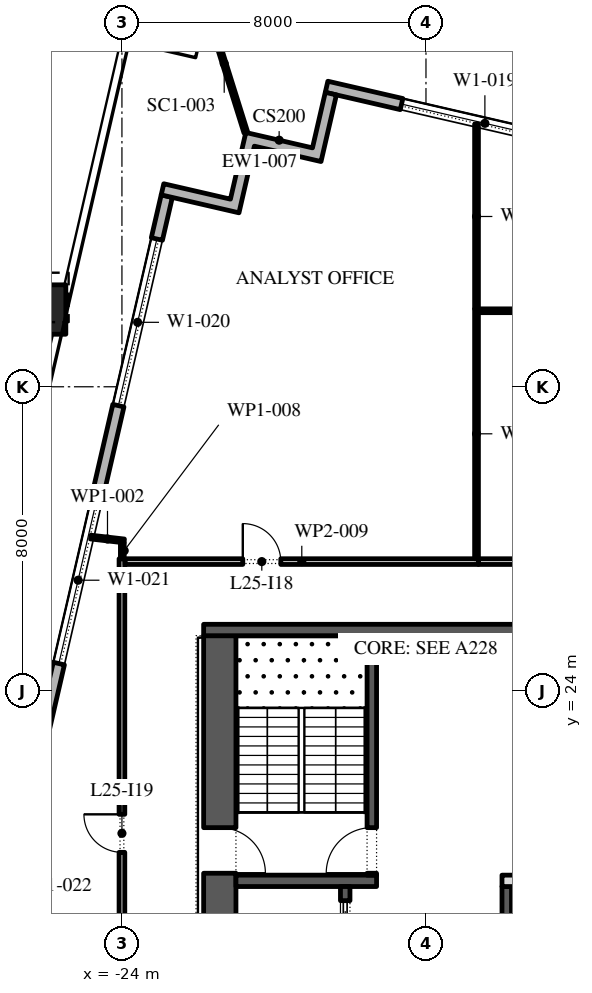
"""IFC4 building model, lengths in metres.
Left out: names, types, materials, properties, quantities, classifications, styles, units other than length and angle.
Written with IfcOpenShell. Run it as: python <this file> out.ifc"""

import sys

from ifc_helpers import new_model, si_unit, direction, frame, frame_2d, origin, origin_2d, place, context, subcontext, project, spatial, polyline, rectangle, outline, extrude, element, fill, save


model = new_model("IFC4")
c1 = context("Model", 3, precision=1e-05, world=origin(), true_north=direction((0.0, 1.0)))
c2 = subcontext(c1, "Body", "Model", "MODEL_VIEW")
j1 = project(units=[si_unit("LENGTHUNIT", "METRE"), si_unit("PLANEANGLEUNIT", "RADIAN")], contexts=[c1])
p1 = place(None, origin())
s1 = spatial("IfcSite", under=j1, at=p1, CompositionType="ELEMENT")
p2 = place(p1, origin())
s2 = spatial("IfcBuilding", under=s1, at=p2, CompositionType="ELEMENT")
p3 = place(p2, frame((0.0, 0.0, 118.2)))
s3 = spatial("IfcBuildingStorey", under=s2, at=p3, CompositionType="ELEMENT", Elevation=118.2)
p4 = place(p3, frame((-26.126, 34.032, 0.0), z_axis=(0.017501948819, 0.075745189095, 0.996973594493), x_axis=(-0.974328337224, 0.225131719848, 0.0)))
e1 = element("IfcColumn", 1, at=p4, inside=s3, PredefinedType="COLUMN", context=c2, shape_type="SweptSolid", body=[
    extrude(rectangle(XDim=1.3, YDim=1.3, at=origin_2d()), origin(), (0.0, 0.0, 1.0), 4.213),
])
p5 = place(p3, frame((31.078, 28.421, 0.0), z_axis=(0.0, 0.0, 1.0), x_axis=(-0.974370456532, 0.224949357493, 0.0)))
e2 = element("IfcWall", 2, at=p5, inside=s3, PredefinedType="STANDARD", context=c2, shape_type="SweptSolid", body=[
    extrude(rectangle(XDim=51.0, YDim=0.3, at=frame_2d((25.5, 0.0))), origin(), (0.0, 0.0, 1.0), 4.0),
])
p6 = place(p5, frame((1.875, 0.0, 0.45)))
e3 = element("IfcOpeningElement", 3, at=p6, cuts=e2, PredefinedType="OPENING", context=c2, shape_type="SweptSolid", body=[
    extrude(rectangle(XDim=4.5, YDim=3.0, at=frame_2d((2.25, 1.5))), frame((0.0, 0.16, 0.0), z_axis=(0.0, -1.0, 0.0), x_axis=(1.0, 0.0, 0.0)), (0.0, 0.0, 1.0), 0.32),
])
p7 = place(p5, frame((10.275, 0.0, 0.45)))
e4 = element("IfcOpeningElement", 4, at=p7, cuts=e2, PredefinedType="OPENING", context=c2, shape_type="SweptSolid", body=[
    extrude(rectangle(XDim=4.5, YDim=2.875, at=frame_2d((2.25, 1.438))), frame((0.0, 0.16, 0.0), z_axis=(0.0, -1.0, 0.0), x_axis=(1.0, 0.0, 0.0)), (0.0, 0.0, 1.0), 0.32),
])
p8 = place(p5, frame((18.825, 0.0, 0.45)))
e5 = element("IfcOpeningElement", 5, at=p8, cuts=e2, PredefinedType="OPENING", context=c2, shape_type="SweptSolid", body=[
    extrude(rectangle(XDim=4.5, YDim=2.825, at=frame_2d((2.25, 1.413))), frame((0.0, 0.16, 0.0), z_axis=(0.0, -1.0, 0.0), x_axis=(1.0, 0.0, 0.0)), (0.0, 0.0, 1.0), 0.32),
])
p9 = place(p5, frame((27.075, 0.0, 0.0)))
e6 = element("IfcOpeningElement", 6, at=p9, cuts=e2, PredefinedType="OPENING", context=c2, shape_type="SweptSolid", body=[
    extrude(rectangle(XDim=2.4, YDim=3.2, at=frame_2d((1.2, 1.6))), frame((0.0, 0.16, 0.0), z_axis=(0.0, -1.0, 0.0), x_axis=(1.0, 0.0, 0.0)), (0.0, 0.0, 1.0), 0.32),
])
p10 = place(p5, frame((35.925, 0.0, 0.45)))
e7 = element("IfcOpeningElement", 7, at=p10, cuts=e2, PredefinedType="OPENING", context=c2, shape_type="SweptSolid", body=[
    extrude(rectangle(XDim=4.5, YDim=2.575, at=frame_2d((2.25, 1.288))), frame((0.0, 0.16, 0.0), z_axis=(0.0, -1.0, 0.0), x_axis=(1.0, 0.0, 0.0)), (0.0, 0.0, 1.0), 0.32),
])
p11 = place(p5, frame((44.475, 0.0, 0.45)))
e8 = element("IfcOpeningElement", 8, at=p11, cuts=e2, PredefinedType="OPENING", context=c2, shape_type="SweptSolid", body=[
    extrude(rectangle(XDim=4.5, YDim=3.05, at=frame_2d((2.25, 1.525))), frame((0.0, 0.16, 0.0), z_axis=(0.0, -1.0, 0.0), x_axis=(1.0, 0.0, 0.0)), (0.0, 0.0, 1.0), 0.32),
])
p12 = place(p3, frame((-22.82, 37.016, 0.0), z_axis=(0.0, 0.0, 1.0), x_axis=(-0.224953880882, -0.974369412223, 0.0)))
e9 = element("IfcWall", 9, at=p12, inside=s3, PredefinedType="STANDARD", context=c2, shape_type="SweptSolid", body=[
    extrude(rectangle(XDim=49.5, YDim=0.3, at=frame_2d((24.75, 0.0))), origin(), (0.0, 0.0, 1.0), 4.0),
])
p13 = place(p12, frame((1.157, 0.0, 0.45)))
e10 = element("IfcOpeningElement", 10, at=p13, cuts=e9, PredefinedType="OPENING", context=c2, shape_type="SweptSolid", body=[
    extrude(rectangle(XDim=4.5, YDim=3.05, at=frame_2d((2.25, 1.525))), frame((0.0, 0.16, 0.0), z_axis=(0.0, -1.0, 0.0), x_axis=(1.0, 0.0, 0.0)), (0.0, 0.0, 1.0), 0.32),
])
p14 = place(p12, frame((8.121, 0.0, 0.45)))
e11 = element("IfcOpeningElement", 11, at=p14, cuts=e9, PredefinedType="OPENING", context=c2, shape_type="SweptSolid", body=[
    extrude(rectangle(XDim=4.5, YDim=3.05, at=frame_2d((2.25, 1.525))), frame((0.0, 0.16, 0.0), z_axis=(0.0, -1.0, 0.0), x_axis=(1.0, 0.0, 0.0)), (0.0, 0.0, 1.0), 0.32),
])
p15 = place(p12, frame((15.236, 0.0, 0.45)))
e12 = element("IfcOpeningElement", 12, at=p15, cuts=e9, PredefinedType="OPENING", context=c2, shape_type="SweptSolid", body=[
    extrude(rectangle(XDim=4.5, YDim=3.05, at=frame_2d((2.25, 1.525))), frame((0.0, 0.16, 0.0), z_axis=(0.0, -1.0, 0.0), x_axis=(1.0, 0.0, 0.0)), (0.0, 0.0, 1.0), 0.32),
])
p16 = place(p12, frame((23.4, 0.0, 0.0)))
e13 = element("IfcOpeningElement", 13, at=p16, cuts=e9, PredefinedType="OPENING", context=c2, shape_type="SweptSolid", body=[
    extrude(rectangle(XDim=2.4, YDim=3.5, at=frame_2d((1.2, 1.75))), frame((0.0, 0.16, 0.0), z_axis=(0.0, -1.0, 0.0), x_axis=(1.0, 0.0, 0.0)), (0.0, 0.0, 1.0), 0.32),
])
p17 = place(p12, frame((29.464, 0.0, 0.45)))
e14 = element("IfcOpeningElement", 14, at=p17, cuts=e9, PredefinedType="OPENING", context=c2, shape_type="SweptSolid", body=[
    extrude(rectangle(XDim=4.5, YDim=2.875, at=frame_2d((2.25, 1.438))), frame((0.0, 0.16, 0.0), z_axis=(0.0, -1.0, 0.0), x_axis=(1.0, 0.0, 0.0)), (0.0, 0.0, 1.0), 0.32),
])
p18 = place(p12, frame((36.579, 0.0, 0.45)))
e15 = element("IfcOpeningElement", 15, at=p18, cuts=e9, PredefinedType="OPENING", context=c2, shape_type="SweptSolid", body=[
    extrude(rectangle(XDim=4.5, YDim=2.675, at=frame_2d((2.25, 1.337))), frame((0.0, 0.16, 0.0), z_axis=(0.0, -1.0, 0.0), x_axis=(1.0, 0.0, 0.0)), (0.0, 0.0, 1.0), 0.32),
])
p19 = place(p12, frame((43.693, 0.0, 0.45)))
e16 = element("IfcOpeningElement", 16, at=p19, cuts=e9, PredefinedType="OPENING", context=c2, shape_type="SweptSolid", body=[
    extrude(rectangle(XDim=4.5, YDim=3.05, at=frame_2d((2.25, 1.525))), frame((0.0, 0.16, 0.0), z_axis=(0.0, -1.0, 0.0), x_axis=(1.0, 0.0, 0.0)), (0.0, 0.0, 1.0), 0.32),
])
p20 = place(p3, origin())
e17 = element("IfcWall", 17, at=p20, inside=s3, PredefinedType="STANDARD", context=c2, shape_type="SweptSolid", body=[
    extrude(outline(polyline([(-22.967, 37.049), (-22.899, 37.342), (-21.145, 36.937), (-20.74, 38.691), (-18.986, 38.286), (-18.649, 39.747), (-18.357, 39.68), (-18.762, 37.926), (-20.515, 38.331), (-20.92, 36.577), (-22.967, 37.049)])), origin(), (0.0, 0.0, 1.0), 4.0),
])
p21 = place(p3, frame((-20.74, 38.691, -0.05), z_axis=(0.0, 0.0, 1.0), x_axis=(-0.299038724035, 0.954240976655, 0.0)))
e18 = element("IfcWall", 18, at=p21, inside=s3, PredefinedType="STANDARD", context=c2, shape_type="SweptSolid", body=[
    extrude(rectangle(XDim=3.804, YDim=0.1, at=frame_2d((1.902, 0.0))), origin(), (0.0, 0.0, 1.0), 4.05),
])
p22 = place(p3, frame((-21.425, -2.45, 0.0), z_axis=(0.0, 0.0, 1.0), x_axis=(0.0, 1.0, 0.0)))
e19 = element("IfcWall", 19, at=p22, inside=s3, PredefinedType="SHEAR", context=c2, shape_type="SweptSolid", body=[
    extrude(rectangle(XDim=27.9, YDim=0.85, at=frame_2d((13.95, 0.0))), origin(), (0.0, 0.0, 1.0), 4.0),
])
p23 = place(p22, frame((5.05, 0.0, 0.0)))
e20 = element("IfcOpeningElement", 20, at=p23, cuts=e19, PredefinedType="OPENING", context=c2, shape_type="SweptSolid", body=[
    extrude(rectangle(XDim=1.2, YDim=2.1, at=frame_2d((0.6, 1.05))), frame((0.0, 0.435, 0.0), z_axis=(0.0, -1.0, 0.0), x_axis=(1.0, 0.0, 0.0)), (0.0, 0.0, 1.0), 0.87),
])
p24 = place(p22, frame((21.65, 0.0, 0.0)))
e21 = element("IfcOpeningElement", 21, at=p24, cuts=e19, PredefinedType="OPENING", context=c2, shape_type="SweptSolid", body=[
    extrude(rectangle(XDim=1.2, YDim=2.1, at=frame_2d((0.6, 1.05))), frame((0.0, 0.435, 0.0), z_axis=(0.0, -1.0, 0.0), x_axis=(1.0, 0.0, 0.0)), (0.0, 0.0, 1.0), 0.87),
])
p25 = place(p3, frame((-21.85, 25.6, 0.0), z_axis=(0.0, 0.0, 1.0), x_axis=(1.0, 0.0, 0.0)))
e22 = element("IfcWall", 22, at=p25, inside=s3, PredefinedType="SHEAR", context=c2, shape_type="SweptSolid", body=[
    extrude(rectangle(XDim=11.7, YDim=0.3, at=frame_2d((5.85, 0.0))), origin(), (0.0, 0.0, 1.0), 4.0),
])
p26 = place(p3, frame((-21.0, 19.0, 0.0), z_axis=(0.0, 0.0, 1.0), x_axis=(1.0, 0.0, 0.0)))
e23 = element("IfcWall", 23, at=p26, inside=s3, PredefinedType="SHEAR", context=c2, shape_type="SweptSolid", body=[
    extrude(rectangle(XDim=3.7, YDim=0.3, at=frame_2d((1.85, 0.0))), origin(), (0.0, 0.0, 1.0), 4.0),
])
p27 = place(p3, frame((-17.425, 19.15, 0.0), z_axis=(0.0, 0.0, 1.0), x_axis=(0.0, 1.0, 0.0)))
e24 = element("IfcWall", 24, at=p27, inside=s3, PredefinedType="SHEAR", context=c2, shape_type="SweptSolid", body=[
    extrude(rectangle(XDim=6.3, YDim=0.25, at=frame_2d((3.15, 0.0))), origin(), (0.0, 0.0, 1.0), 4.0),
])
p28 = place(p27, frame((0.05, 0.0, 0.0)))
e25 = element("IfcOpeningElement", 25, at=p28, cuts=e24, PredefinedType="OPENING", context=c2, shape_type="SweptSolid", body=[
    extrude(rectangle(XDim=1.2, YDim=2.1, at=frame_2d((0.6, 1.05))), frame((0.0, 0.135, 0.0), z_axis=(0.0, -1.0, 0.0), x_axis=(1.0, 0.0, 0.0)), (0.0, 0.0, 1.0), 0.27),
])
p29 = place(p3, frame((-18.125, 4.15, 0.0), z_axis=(0.0, 0.0, 1.0), x_axis=(0.0, 1.0, 0.0)))
e26 = element("IfcWall", 26, at=p29, inside=s3, PredefinedType="SHEAR", context=c2, shape_type="SweptSolid", body=[
    extrude(rectangle(XDim=14.7, YDim=0.25, at=frame_2d((7.35, 0.0))), origin(), (0.0, 0.0, 1.0), 4.0),
])
p30 = place(p29, frame((0.371, 0.0, 0.0)))
e27 = element("IfcOpeningElement", 27, at=p30, cuts=e26, PredefinedType="OPENING", context=c2, shape_type="SweptSolid", body=[
    extrude(rectangle(XDim=1.1, YDim=2.1, at=frame_2d((0.55, 1.05))), frame((0.0, 0.135, 0.0), z_axis=(0.0, -1.0, 0.0), x_axis=(1.0, 0.0, 0.0)), (0.0, 0.0, 1.0), 0.27),
])
p31 = place(p29, frame((2.514, 0.0, 0.0)))
e28 = element("IfcOpeningElement", 28, at=p31, cuts=e26, PredefinedType="OPENING", context=c2, shape_type="SweptSolid", body=[
    extrude(rectangle(XDim=1.1, YDim=2.1, at=frame_2d((0.55, 1.05))), frame((0.0, 0.135, 0.0), z_axis=(0.0, -1.0, 0.0), x_axis=(1.0, 0.0, 0.0)), (0.0, 0.0, 1.0), 0.27),
])
p32 = place(p29, frame((4.657, 0.0, 0.0)))
e29 = element("IfcOpeningElement", 29, at=p32, cuts=e26, PredefinedType="OPENING", context=c2, shape_type="SweptSolid", body=[
    extrude(rectangle(XDim=1.1, YDim=2.1, at=frame_2d((0.55, 1.05))), frame((0.0, 0.135, 0.0), z_axis=(0.0, -1.0, 0.0), x_axis=(1.0, 0.0, 0.0)), (0.0, 0.0, 1.0), 0.27),
])
p33 = place(p29, frame((6.8, 0.0, 0.0)))
e30 = element("IfcOpeningElement", 30, at=p33, cuts=e26, PredefinedType="OPENING", context=c2, shape_type="SweptSolid", body=[
    extrude(rectangle(XDim=1.1, YDim=2.1, at=frame_2d((0.55, 1.05))), frame((0.0, 0.135, 0.0), z_axis=(0.0, -1.0, 0.0), x_axis=(1.0, 0.0, 0.0)), (0.0, 0.0, 1.0), 0.27),
])
p34 = place(p29, frame((8.943, 0.0, 0.0)))
e31 = element("IfcOpeningElement", 31, at=p34, cuts=e26, PredefinedType="OPENING", context=c2, shape_type="SweptSolid", body=[
    extrude(rectangle(XDim=1.1, YDim=2.1, at=frame_2d((0.55, 1.05))), frame((0.0, 0.135, 0.0), z_axis=(0.0, -1.0, 0.0), x_axis=(1.0, 0.0, 0.0)), (0.0, 0.0, 1.0), 0.27),
])
p35 = place(p29, frame((11.086, 0.0, 0.0)))
e32 = element("IfcOpeningElement", 32, at=p35, cuts=e26, PredefinedType="OPENING", context=c2, shape_type="SweptSolid", body=[
    extrude(rectangle(XDim=1.1, YDim=2.1, at=frame_2d((0.55, 1.05))), frame((0.0, 0.135, 0.0), z_axis=(0.0, -1.0, 0.0), x_axis=(1.0, 0.0, 0.0)), (0.0, 0.0, 1.0), 0.27),
])
p36 = place(p29, frame((13.229, 0.0, 0.0)))
e33 = element("IfcOpeningElement", 33, at=p36, cuts=e26, PredefinedType="OPENING", context=c2, shape_type="SweptSolid", body=[
    extrude(rectangle(XDim=1.1, YDim=2.1, at=frame_2d((0.55, 1.05))), frame((0.0, 0.135, 0.0), z_axis=(0.0, -1.0, 0.0), x_axis=(1.0, 0.0, 0.0)), (0.0, 0.0, 1.0), 0.27),
])
p37 = place(p3, frame((-13.875, -2.45, 0.0), z_axis=(0.0, 0.0, 1.0), x_axis=(0.0, 1.0, 0.0)))
e34 = element("IfcWall", 34, at=p37, inside=s3, PredefinedType="SHEAR", context=c2, shape_type="SweptSolid", body=[
    extrude(rectangle(XDim=21.3, YDim=0.25, at=frame_2d((10.65, 0.0))), origin(), (0.0, 0.0, 1.0), 4.0),
])
p38 = place(p37, frame((14.571, 0.0, 0.0)))
e35 = element("IfcOpeningElement", 35, at=p38, cuts=e34, PredefinedType="OPENING", context=c2, shape_type="SweptSolid", body=[
    extrude(rectangle(XDim=0.9, YDim=2.1, at=frame_2d((0.45, 1.05))), frame((0.0, 0.135, 0.0), z_axis=(0.0, -1.0, 0.0), x_axis=(1.0, 0.0, 0.0)), (0.0, 0.0, 1.0), 0.27),
])
p39 = place(p37, frame((6.971, 0.0, 0.0)))
e36 = element("IfcOpeningElement", 36, at=p39, cuts=e34, PredefinedType="OPENING", context=c2, shape_type="SweptSolid", body=[
    extrude(rectangle(XDim=1.1, YDim=2.1, at=frame_2d((0.55, 1.05))), frame((0.0, 0.135, 0.0), z_axis=(0.0, -1.0, 0.0), x_axis=(1.0, 0.0, 0.0)), (0.0, 0.0, 1.0), 0.27),
])
p40 = place(p3, frame((-14.0, 19.0, 0.0), z_axis=(0.0, 0.0, 1.0), x_axis=(1.0, 0.0, 0.0)))
e37 = element("IfcWall", 37, at=p40, inside=s3, PredefinedType="PARTITIONING", context=c2, shape_type="SweptSolid", body=[
    extrude(rectangle(XDim=3.0, YDim=0.3, at=frame_2d((1.5, 0.0))), origin(), (0.0, 0.0, 1.0), 4.0),
])
p41 = place(p3, frame((-24.82, 28.045, 0.0), z_axis=(0.0, 0.0, 1.0), x_axis=(0.993501545499, -0.113818623659, 0.0)))
e38 = element("IfcWall", 38, at=p41, inside=s3, PredefinedType="PARTITIONING", context=c2, shape_type="SweptSolid", body=[
    extrude(rectangle(XDim=0.886, YDim=0.1, at=frame_2d((0.443, 0.0))), origin(), (0.0, 0.0, 1.0), 4.0),
])
p42 = place(p3, frame((-24.0, 3.45, 0.0), z_axis=(0.0, 0.0, 1.0), x_axis=(0.0, 1.0, 0.0)))
e39 = element("IfcWall", 39, at=p42, inside=s3, PredefinedType="PARTITIONING", context=c2, shape_type="SweptSolid", body=[
    extrude(rectangle(XDim=24.025, YDim=0.15, at=frame_2d((12.013, 0.0))), origin(), (0.0, 0.0, 1.0), 4.0),
])
p43 = place(p42, frame((16.3, 0.0, 0.0)))
e40 = element("IfcOpeningElement", 40, at=p43, cuts=e39, PredefinedType="OPENING", context=c2, shape_type="SweptSolid", body=[
    extrude(rectangle(XDim=1.0, YDim=2.1, at=frame_2d((0.5, 1.05))), frame((0.0, 0.085, 0.0), z_axis=(0.0, -1.0, 0.0), x_axis=(1.0, 0.0, 0.0)), (0.0, 0.0, 1.0), 0.17),
])
p44 = place(p3, frame((-23.99, 27.475, 0.0), z_axis=(0.0, 0.0, 1.0), x_axis=(0.0, 1.0, 0.0)))
e41 = element("IfcWall", 41, at=p44, inside=s3, PredefinedType="PARTITIONING", context=c2, shape_type="SweptSolid", body=[
    extrude(rectangle(XDim=0.425, YDim=0.1, at=frame_2d((0.212, 0.0))), origin(), (0.0, 0.0, 1.0), 4.0),
])
p45 = place(p3, frame((-23.915, 27.4, 0.0), z_axis=(0.0, 0.0, 1.0), x_axis=(1.0, 0.0, 0.0)))
e42 = element("IfcWall", 42, at=p45, inside=s3, PredefinedType="PARTITIONING", context=c2, shape_type="SweptSolid", body=[
    extrude(rectangle(XDim=9.295, YDim=0.15, at=frame_2d((4.647, 0.0))), origin(), (0.0, 0.0, 1.0), 4.0),
])
p46 = place(p45, frame((3.095, 0.0, 0.0)))
e43 = element("IfcOpeningElement", 43, at=p46, cuts=e42, PredefinedType="OPENING", context=c2, shape_type="SweptSolid", body=[
    extrude(rectangle(XDim=1.0, YDim=2.1, at=frame_2d((0.5, 1.05))), frame((0.0, 0.085, 0.0), z_axis=(0.0, -1.0, 0.0), x_axis=(1.0, 0.0, 0.0)), (0.0, 0.0, 1.0), 0.17),
])
p47 = place(p3, frame((-14.67, 27.475, 0.0), z_axis=(0.0, 0.0, 1.0), x_axis=(0.0, 1.0, 0.0)))
e44 = element("IfcWall", 44, at=p47, inside=s3, PredefinedType="PARTITIONING", context=c2, shape_type="SweptSolid", body=[
    extrude(rectangle(XDim=6.575, YDim=0.1, at=frame_2d((3.288, 0.0))), origin(), (0.0, 0.0, 1.0), 4.0),
])
p48 = place(p3, frame((-14.62, 27.4, 0.0), z_axis=(0.0, 0.0, 1.0), x_axis=(1.0, 0.0, 0.0)))
e45 = element("IfcWall", 45, at=p48, inside=s3, PredefinedType="PARTITIONING", context=c2, shape_type="SweptSolid", body=[
    extrude(rectangle(XDim=6.695, YDim=0.15, at=frame_2d((3.348, 0.0))), origin(), (0.0, 0.0, 1.0), 4.0),
])
p49 = place(p3, frame((-14.67, 34.05, 0.0), z_axis=(0.0, 0.0, 1.0), x_axis=(0.0, 1.0, 0.0)))
e46 = element("IfcWall", 46, at=p49, inside=s3, PredefinedType="PARTITIONING", context=c2, shape_type="SweptSolid", body=[
    extrude(rectangle(XDim=4.861, YDim=0.1, at=frame_2d((2.43, 0.0))), origin(), (0.0, 0.0, 1.0), 4.0),
])
p50 = place(p3, frame((-3.95, 34.0, 0.0), z_axis=(0.0, 0.0, 1.0), x_axis=(-1.0, 0.0, 0.0)))
e47 = element("IfcWall", 47, at=p50, inside=s3, PredefinedType="PARTITIONING", context=c2, shape_type="SweptSolid", body=[
    extrude(rectangle(XDim=10.67, YDim=0.1, at=frame_2d((5.335, 0.0))), origin(), (0.0, 0.0, 1.0), 4.0),
])
p51 = place(p50, frame((7.0, 0.0, 0.0)))
e48 = element("IfcOpeningElement", 48, at=p51, cuts=e47, PredefinedType="OPENING", context=c2, shape_type="SweptSolid", body=[
    extrude(rectangle(XDim=0.9, YDim=2.1, at=frame_2d((0.45, 1.05))), frame((0.0, 0.06, 0.0), z_axis=(0.0, -1.0, 0.0), x_axis=(1.0, 0.0, 0.0)), (0.0, 0.0, 1.0), 0.12),
])
p52 = place(p11, origin())
e49 = element("IfcWindow", 49, at=p52, inside=s3, PartitioningType="DOUBLE_PANEL_VERTICAL", PredefinedType="WINDOW", context=c2, shape_type="SweptSolid", body=[
    extrude(rectangle(XDim=4.5, YDim=3.05, at=frame_2d((2.25, 1.525))), frame((0.0, 0.03, 0.0), z_axis=(0.0, -1.0, 0.0), x_axis=(1.0, 0.0, 0.0)), (0.0, 0.0, 1.0), 0.06),
])
fill(e8, e49)
p53 = place(p13, origin())
e50 = element("IfcWindow", 50, at=p53, inside=s3, PartitioningType="DOUBLE_PANEL_VERTICAL", PredefinedType="WINDOW", context=c2, shape_type="SweptSolid", body=[
    extrude(rectangle(XDim=4.5, YDim=3.05, at=frame_2d((2.25, 1.525))), frame((0.0, 0.03, 0.0), z_axis=(0.0, -1.0, 0.0), x_axis=(1.0, 0.0, 0.0)), (0.0, 0.0, 1.0), 0.06),
])
fill(e10, e50)
p54 = place(p14, origin())
e51 = element("IfcWindow", 51, at=p54, inside=s3, PartitioningType="DOUBLE_PANEL_VERTICAL", PredefinedType="WINDOW", context=c2, shape_type="SweptSolid", body=[
    extrude(rectangle(XDim=4.5, YDim=3.05, at=frame_2d((2.25, 1.525))), frame((0.0, 0.03, 0.0), z_axis=(0.0, -1.0, 0.0), x_axis=(1.0, 0.0, 0.0)), (0.0, 0.0, 1.0), 0.06),
])
fill(e11, e51)
p55 = place(p36, origin())
e52 = element("IfcDoor", 52, at=p55, inside=s3, OperationType="SLIDING_TO_LEFT", PredefinedType="DOOR", context=c2, shape_type="SweptSolid", body=[
    extrude(rectangle(XDim=1.1, YDim=2.1, at=frame_2d((0.55, 1.05))), frame((0.0, 0.025, 0.0), z_axis=(0.0, -1.0, 0.0), x_axis=(1.0, 0.0, 0.0)), (0.0, 0.0, 1.0), 0.05),
])
fill(e33, e52)
p56 = place(p28, origin())
e53 = element("IfcDoor", 53, at=p56, inside=s3, OperationType="SINGLE_SWING_RIGHT", PredefinedType="DOOR", context=c2, shape_type="SweptSolid", body=[
    extrude(rectangle(XDim=1.2, YDim=2.1, at=frame_2d((0.6, 1.05))), frame((0.0, 0.025, 0.0), z_axis=(0.0, -1.0, 0.0), x_axis=(1.0, 0.0, 0.0)), (0.0, 0.0, 1.0), 0.05),
])
fill(e25, e53)
p57 = place(p24, frame((1.2, 0.0, 0.0), z_axis=(0.0, 0.0, 1.0), x_axis=(-1.0, 0.0, 0.0)))
e54 = element("IfcDoor", 54, at=p57, inside=s3, OperationType="SINGLE_SWING_LEFT", PredefinedType="DOOR", context=c2, shape_type="SweptSolid", body=[
    extrude(rectangle(XDim=1.2, YDim=2.1, at=frame_2d((0.6, 1.05))), frame((0.0, 0.025, 0.0), z_axis=(0.0, -1.0, 0.0), x_axis=(1.0, 0.0, 0.0)), (0.0, 0.0, 1.0), 0.05),
])
fill(e21, e54)
p58 = place(p46, origin())
e55 = element("IfcDoor", 55, at=p58, inside=s3, OperationType="SINGLE_SWING_RIGHT", PredefinedType="DOOR", context=c2, shape_type="SweptSolid", body=[
    extrude(rectangle(XDim=1.0, YDim=2.1, at=frame_2d((0.5, 1.05))), frame((0.0, 0.025, 0.0), z_axis=(0.0, -1.0, 0.0), x_axis=(1.0, 0.0, 0.0)), (0.0, 0.0, 1.0), 0.05),
])
fill(e43, e55)
p59 = place(p43, origin())
e56 = element("IfcDoor", 56, at=p59, inside=s3, OperationType="SINGLE_SWING_LEFT", PredefinedType="DOOR", context=c2, shape_type="SweptSolid", body=[
    extrude(rectangle(XDim=1.0, YDim=2.1, at=frame_2d((0.5, 1.05))), frame((0.0, 0.025, 0.0), z_axis=(0.0, -1.0, 0.0), x_axis=(1.0, 0.0, 0.0)), (0.0, 0.0, 1.0), 0.05),
])
fill(e40, e56)
save(model, sys.argv[1])
